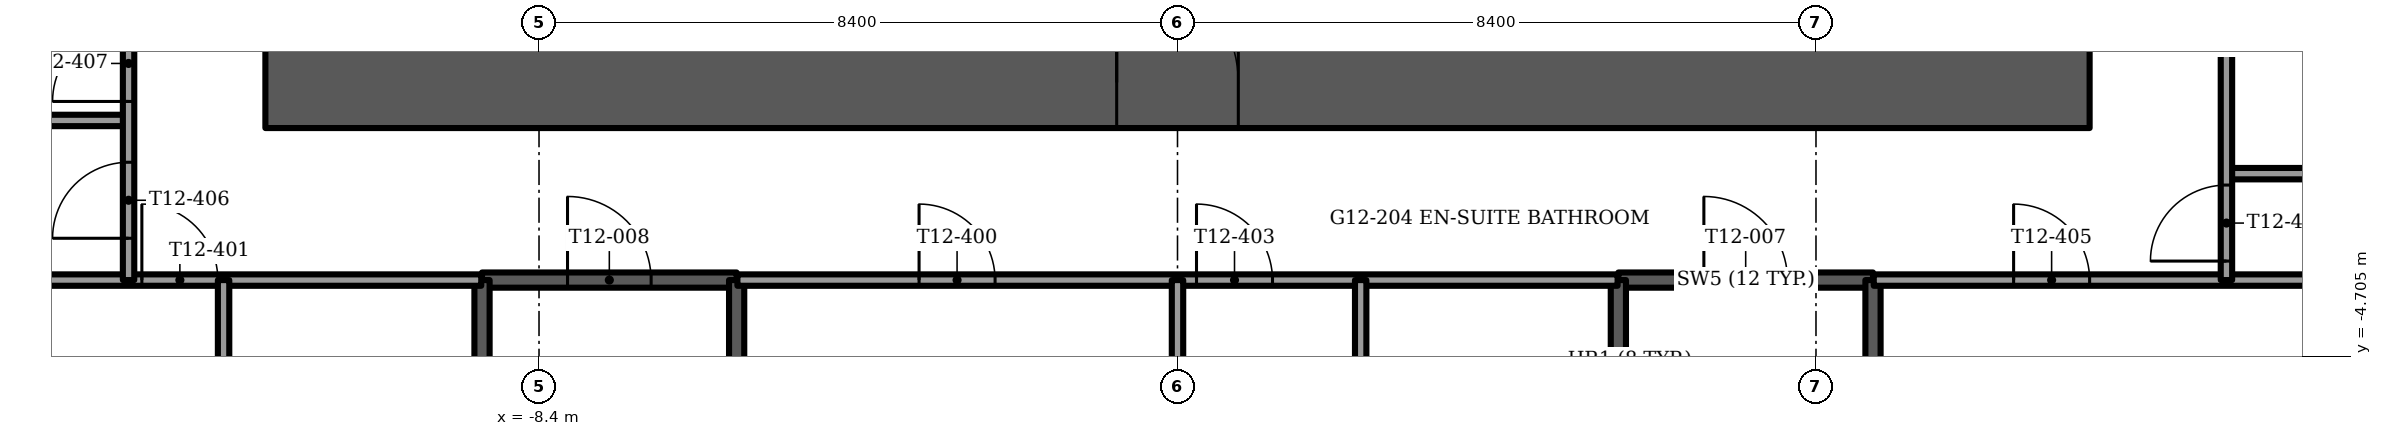
"""IFC4 building model, lengths in metres.
Left out: names, types, materials, properties, quantities, classifications, styles, units other than length and angle.
Written with IfcOpenShell. Run it as: python <this file> out.ifc"""

import sys

from ifc_helpers import new_model, si_unit, direction, frame, frame_2d, origin, place, context, subcontext, project, spatial, rectangle, extrude, element, fill, save


model = new_model("IFC4")
c1 = context("Model", 3, precision=1e-05, world=origin(), true_north=direction((0.0, 1.0)))
c2 = subcontext(c1, "Body", "Model", "MODEL_VIEW")
j1 = project(units=[si_unit("LENGTHUNIT", "METRE"), si_unit("PLANEANGLEUNIT", "RADIAN")], contexts=[c1])
p1 = place(None, origin())
s1 = spatial("IfcSite", under=j1, at=p1, CompositionType="ELEMENT")
p2 = place(p1, origin())
s2 = spatial("IfcBuilding", under=s1, at=p2, CompositionType="ELEMENT")
p3 = place(p2, frame((0.0, 0.0, 50.5)))
s3 = spatial("IfcBuildingStorey", under=s2, at=p3, CompositionType="ELEMENT", Elevation=50.5)
p4 = place(p3, frame((-12.0, -1.1, -0.3), z_axis=(0.0, 0.0, 1.0), x_axis=(1.0, 0.0, 0.0)))
e1 = element("IfcWall", 1, at=p4, inside=s3, PredefinedType="SHEAR", context=c2, shape_type="SweptSolid", body=[
    extrude(rectangle(XDim=24.0, YDim=1.2, at=frame_2d((12.0, 0.0))), origin(), (0.0, 0.0, 1.0), 3.75),
])
p5 = place(p4, frame((11.2, 0.0, 0.0)))
e2 = element("IfcOpeningElement", 2, at=p5, cuts=e1, PredefinedType="OPENING", context=c2, shape_type="SweptSolid", body=[
    extrude(rectangle(XDim=1.6, YDim=2.1, at=frame_2d((0.8, 1.05))), frame((0.0, 0.6, 0.0), z_axis=(0.0, -1.0, 0.0), x_axis=(1.0, 0.0, 0.0)), (0.0, 0.0, 1.0), 1.2),
])
p6 = place(p3, frame((-20.685, -1.023, 0.0), z_axis=(0.0, 0.0, 1.0), x_axis=(0.500004426522, -0.866022848116, 0.0)))
e3 = element("IfcWall", 3, at=p6, inside=s3, PredefinedType="SOLIDWALL", context=c2, shape_type="SweptSolid", body=[
    extrude(rectangle(XDim=18.912, YDim=0.15, at=frame_2d((9.456, 0.0))), origin(), (0.0, 0.0, 1.0), 3.45),
])
p7 = place(p6, frame((1.356, 0.0, 0.15)))
e4 = element("IfcOpeningElement", 4, at=p7, cuts=e3, PredefinedType="OPENING", context=c2, shape_type="SweptSolid", body=[
    extrude(rectangle(XDim=0.9, YDim=2.85, at=frame_2d((0.45, 1.425))), frame((0.0, 0.075, 0.0), z_axis=(0.0, -1.0, 0.0), x_axis=(1.0, 0.0, 0.0)), (0.0, 0.0, 1.0), 0.15),
])
p8 = place(p6, frame((5.556, 0.0, 0.15)))
e5 = element("IfcOpeningElement", 5, at=p8, cuts=e3, PredefinedType="OPENING", context=c2, shape_type="SweptSolid", body=[
    extrude(rectangle(XDim=1.8, YDim=2.85, at=frame_2d((0.9, 1.425))), frame((0.0, 0.075, 0.0), z_axis=(0.0, -1.0, 0.0), x_axis=(1.0, 0.0, 0.0)), (0.0, 0.0, 1.0), 0.15),
])
p9 = place(p6, frame((7.656, 0.0, 0.0)))
e6 = element("IfcOpeningElement", 6, at=p9, cuts=e3, PredefinedType="OPENING", context=c2, shape_type="SweptSolid", body=[
    extrude(rectangle(XDim=1.5, YDim=2.4, at=frame_2d((0.75, 1.2))), frame((0.0, 0.075, 0.0), z_axis=(0.0, -1.0, 0.0), x_axis=(1.0, 0.0, 0.0)), (0.0, 0.0, 1.0), 0.15),
])
p10 = place(p6, frame((9.756, 0.0, 0.15)))
e7 = element("IfcOpeningElement", 7, at=p10, cuts=e3, PredefinedType="OPENING", context=c2, shape_type="SweptSolid", body=[
    extrude(rectangle(XDim=1.8, YDim=2.85, at=frame_2d((0.9, 1.425))), frame((0.0, 0.075, 0.0), z_axis=(0.0, -1.0, 0.0), x_axis=(1.0, 0.0, 0.0)), (0.0, 0.0, 1.0), 0.15),
])
p11 = place(p6, frame((11.856, 0.0, 0.0)))
e8 = element("IfcOpeningElement", 8, at=p11, cuts=e3, PredefinedType="OPENING", context=c2, shape_type="SweptSolid", body=[
    extrude(rectangle(XDim=1.5, YDim=2.4, at=frame_2d((0.75, 1.2))), frame((0.0, 0.075, 0.0), z_axis=(0.0, -1.0, 0.0), x_axis=(1.0, 0.0, 0.0)), (0.0, 0.0, 1.0), 0.15),
])
p12 = place(p6, frame((13.956, 0.0, 0.15)))
e9 = element("IfcOpeningElement", 9, at=p12, cuts=e3, PredefinedType="OPENING", context=c2, shape_type="SweptSolid", body=[
    extrude(rectangle(XDim=1.8, YDim=2.85, at=frame_2d((0.9, 1.425))), frame((0.0, 0.075, 0.0), z_axis=(0.0, -1.0, 0.0), x_axis=(1.0, 0.0, 0.0)), (0.0, 0.0, 1.0), 0.15),
])
p13 = place(p6, frame((16.056, 0.0, 0.0)))
e10 = element("IfcOpeningElement", 10, at=p13, cuts=e3, PredefinedType="OPENING", context=c2, shape_type="SweptSolid", body=[
    extrude(rectangle(XDim=1.5, YDim=2.4, at=frame_2d((0.75, 1.2))), frame((0.0, 0.075, 0.0), z_axis=(0.0, -1.0, 0.0), x_axis=(1.0, 0.0, 0.0)), (0.0, 0.0, 1.0), 0.15),
])
p14 = place(p3, frame((11.229, -17.402, 0.0), z_axis=(0.0, 0.0, 1.0), x_axis=(0.500004426522, 0.866022848116, 0.0)))
e11 = element("IfcWall", 11, at=p14, inside=s3, PredefinedType="SOLIDWALL", context=c2, shape_type="SweptSolid", body=[
    extrude(rectangle(XDim=18.912, YDim=0.15, at=frame_2d((9.456, 0.0))), origin(), (0.0, 0.0, 1.0), 3.45),
])
p15 = place(p14, frame((1.356, 0.0, 0.15)))
e12 = element("IfcOpeningElement", 12, at=p15, cuts=e11, PredefinedType="OPENING", context=c2, shape_type="SweptSolid", body=[
    extrude(rectangle(XDim=1.8, YDim=2.85, at=frame_2d((0.9, 1.425))), frame((0.0, 0.075, 0.0), z_axis=(0.0, -1.0, 0.0), x_axis=(1.0, 0.0, 0.0)), (0.0, 0.0, 1.0), 0.15),
])
p16 = place(p14, frame((3.456, 0.0, 0.0)))
e13 = element("IfcOpeningElement", 13, at=p16, cuts=e11, PredefinedType="OPENING", context=c2, shape_type="SweptSolid", body=[
    extrude(rectangle(XDim=1.5, YDim=2.4, at=frame_2d((0.75, 1.2))), frame((0.0, 0.075, 0.0), z_axis=(0.0, -1.0, 0.0), x_axis=(1.0, 0.0, 0.0)), (0.0, 0.0, 1.0), 0.15),
])
p17 = place(p14, frame((5.556, 0.0, 0.15)))
e14 = element("IfcOpeningElement", 14, at=p17, cuts=e11, PredefinedType="OPENING", context=c2, shape_type="SweptSolid", body=[
    extrude(rectangle(XDim=1.8, YDim=2.85, at=frame_2d((0.9, 1.425))), frame((0.0, 0.075, 0.0), z_axis=(0.0, -1.0, 0.0), x_axis=(1.0, 0.0, 0.0)), (0.0, 0.0, 1.0), 0.15),
])
p18 = place(p14, frame((7.656, 0.0, 0.0)))
e15 = element("IfcOpeningElement", 15, at=p18, cuts=e11, PredefinedType="OPENING", context=c2, shape_type="SweptSolid", body=[
    extrude(rectangle(XDim=1.5, YDim=2.4, at=frame_2d((0.75, 1.2))), frame((0.0, 0.075, 0.0), z_axis=(0.0, -1.0, 0.0), x_axis=(1.0, 0.0, 0.0)), (0.0, 0.0, 1.0), 0.15),
])
p19 = place(p14, frame((9.756, 0.0, 0.15)))
e16 = element("IfcOpeningElement", 16, at=p19, cuts=e11, PredefinedType="OPENING", context=c2, shape_type="SweptSolid", body=[
    extrude(rectangle(XDim=1.8, YDim=2.85, at=frame_2d((0.9, 1.425))), frame((0.0, 0.075, 0.0), z_axis=(0.0, -1.0, 0.0), x_axis=(1.0, 0.0, 0.0)), (0.0, 0.0, 1.0), 0.15),
])
p20 = place(p14, frame((11.856, 0.0, 0.0)))
e17 = element("IfcOpeningElement", 17, at=p20, cuts=e11, PredefinedType="OPENING", context=c2, shape_type="SweptSolid", body=[
    extrude(rectangle(XDim=1.5, YDim=2.4, at=frame_2d((0.75, 1.2))), frame((0.0, 0.075, 0.0), z_axis=(0.0, -1.0, 0.0), x_axis=(1.0, 0.0, 0.0)), (0.0, 0.0, 1.0), 0.15),
])
p21 = place(p14, frame((13.956, 0.0, 0.15)))
e18 = element("IfcOpeningElement", 18, at=p21, cuts=e11, PredefinedType="OPENING", context=c2, shape_type="SweptSolid", body=[
    extrude(rectangle(XDim=0.9, YDim=2.85, at=frame_2d((0.45, 1.425))), frame((0.0, 0.075, 0.0), z_axis=(0.0, -1.0, 0.0), x_axis=(1.0, 0.0, 0.0)), (0.0, 0.0, 1.0), 0.15),
])
p22 = place(p3, frame((5.8, -3.7, -0.3), z_axis=(0.0, 0.0, 1.0), x_axis=(1.0, 0.0, 0.0)))
e19 = element("IfcWall", 19, at=p22, inside=s3, PredefinedType="SOLIDWALL", context=c2, shape_type="SweptSolid", body=[
    extrude(rectangle(XDim=3.35, YDim=0.2, at=frame_2d((1.675, 0.0))), origin(), (0.0, 0.0, 1.0), 3.75),
])
p23 = place(p22, frame((1.125, 0.0, 0.0)))
e20 = element("IfcOpeningElement", 20, at=p23, cuts=e19, PredefinedType="OPENING", context=c2, shape_type="SweptSolid", body=[
    extrude(rectangle(XDim=1.1, YDim=2.1, at=frame_2d((0.55, 1.05))), frame((0.0, 0.1, 0.0), z_axis=(0.0, -1.0, 0.0), x_axis=(1.0, 0.0, 0.0)), (0.0, 0.0, 1.0), 0.2),
])
for number, where, z_axis, x_axis in (
    (21, (5.8, -3.7, -0.3), (0.0, 0.0, 1.0), (0.0, -1.0, 0.0)),
    (22, (9.15, -3.7, -0.3), (0.0, 0.0, 1.0), (0.0, -1.0, 0.0)),
):
    element("IfcWall", number, at=place(p3, frame(where, z_axis=z_axis, x_axis=x_axis)), inside=s3, PredefinedType="SOLIDWALL", context=c2, shape_type="SweptSolid", body=[
        extrude(rectangle(XDim=7.7, YDim=0.2, at=frame_2d((3.85, 0.0))), origin(), (0.0, 0.0, 1.0), 3.75),
    ])
p24 = place(p3, frame((-9.15, -3.7, -0.3), z_axis=(0.0, 0.0, 1.0), x_axis=(1.0, 0.0, 0.0)))
e23 = element("IfcWall", 23, at=p24, inside=s3, PredefinedType="SOLIDWALL", context=c2, shape_type="SweptSolid", body=[
    extrude(rectangle(XDim=3.35, YDim=0.2, at=frame_2d((1.675, 0.0))), origin(), (0.0, 0.0, 1.0), 3.75),
])
p25 = place(p24, frame((1.125, 0.0, 0.0)))
e24 = element("IfcOpeningElement", 24, at=p25, cuts=e23, PredefinedType="OPENING", context=c2, shape_type="SweptSolid", body=[
    extrude(rectangle(XDim=1.1, YDim=2.1, at=frame_2d((0.55, 1.05))), frame((0.0, 0.1, 0.0), z_axis=(0.0, -1.0, 0.0), x_axis=(1.0, 0.0, 0.0)), (0.0, 0.0, 1.0), 0.2),
])
for number, where, z_axis, x_axis in (
    (25, (-9.15, -3.7, -0.3), (0.0, 0.0, 1.0), (0.0, -1.0, 0.0)),
    (26, (-5.8, -3.7, -0.3), (0.0, 0.0, 1.0), (0.0, -1.0, 0.0)),
):
    element("IfcWall", number, at=place(p3, frame(where, z_axis=z_axis, x_axis=x_axis)), inside=s3, PredefinedType="SOLIDWALL", context=c2, shape_type="SweptSolid", body=[
        extrude(rectangle(XDim=7.7, YDim=0.2, at=frame_2d((3.85, 0.0))), origin(), (0.0, 0.0, 1.0), 3.75),
    ])
p26 = place(p3, frame((-19.191, -3.7, 0.0), z_axis=(0.0, 0.0, 1.0), x_axis=(1.0, 0.0, 0.0)))
e27 = element("IfcWall", 27, at=p26, inside=s3, PredefinedType="PARTITIONING", context=c2, shape_type="SweptSolid", body=[
    extrude(rectangle(XDim=10.031, YDim=0.15, at=frame_2d((5.016, 0.0))), origin(), (0.0, 0.0, 1.0), 3.45),
])
p27 = place(p26, frame((5.566, 0.0, 0.0)))
e28 = element("IfcOpeningElement", 28, at=p27, cuts=e27, PredefinedType="OPENING", context=c2, shape_type="SweptSolid", body=[
    extrude(rectangle(XDim=1.0, YDim=2.1, at=frame_2d((0.5, 1.05))), frame((0.0, 0.075, 0.0), z_axis=(0.0, -1.0, 0.0), x_axis=(1.0, 0.0, 0.0)), (0.0, 0.0, 1.0), 0.15),
])
p28 = place(p3, frame((-5.79, -3.7, 0.0), z_axis=(0.0, 0.0, 1.0), x_axis=(1.0, 0.0, 0.0)))
e29 = element("IfcWall", 29, at=p28, inside=s3, PredefinedType="PARTITIONING", context=c2, shape_type="SweptSolid", body=[
    extrude(rectangle(XDim=11.58, YDim=0.15, at=frame_2d((5.79, 0.0))), origin(), (0.0, 0.0, 1.0), 3.45),
])
p29 = place(p28, frame((2.39, 0.0, 0.0)))
e30 = element("IfcOpeningElement", 30, at=p29, cuts=e29, PredefinedType="OPENING", context=c2, shape_type="SweptSolid", body=[
    extrude(rectangle(XDim=1.0, YDim=2.1, at=frame_2d((0.5, 1.05))), frame((0.0, 0.075, 0.0), z_axis=(0.0, -1.0, 0.0), x_axis=(1.0, 0.0, 0.0)), (0.0, 0.0, 1.0), 0.15),
])
p30 = place(p28, frame((6.04, 0.0, 0.0)))
e31 = element("IfcOpeningElement", 31, at=p30, cuts=e29, PredefinedType="OPENING", context=c2, shape_type="SweptSolid", body=[
    extrude(rectangle(XDim=1.0, YDim=2.1, at=frame_2d((0.5, 1.05))), frame((0.0, 0.075, 0.0), z_axis=(0.0, -1.0, 0.0), x_axis=(1.0, 0.0, 0.0)), (0.0, 0.0, 1.0), 0.15),
])
p31 = place(p3, frame((9.16, -3.7, 0.0), z_axis=(0.0, 0.0, 1.0), x_axis=(1.0, 0.0, 0.0)))
e32 = element("IfcWall", 32, at=p31, inside=s3, PredefinedType="PARTITIONING", context=c2, shape_type="SweptSolid", body=[
    extrude(rectangle(XDim=10.031, YDim=0.15, at=frame_2d((5.016, 0.0))), origin(), (0.0, 0.0, 1.0), 3.45),
])
p32 = place(p31, frame((1.84, 0.0, 0.0)))
e33 = element("IfcOpeningElement", 33, at=p32, cuts=e32, PredefinedType="OPENING", context=c2, shape_type="SweptSolid", body=[
    extrude(rectangle(XDim=1.0, YDim=2.1, at=frame_2d((0.5, 1.05))), frame((0.0, 0.075, 0.0), z_axis=(0.0, -1.0, 0.0), x_axis=(1.0, 0.0, 0.0)), (0.0, 0.0, 1.0), 0.15),
])
p33 = place(p3, frame((13.8, -2.3, 0.0), z_axis=(0.0, 0.0, 1.0), x_axis=(1.0, 0.0, 0.0)))
e34 = element("IfcWall", 34, at=p33, inside=s3, PredefinedType="PARTITIONING", context=c2, shape_type="SweptSolid", body=[
    extrude(rectangle(XDim=3.05, YDim=0.15, at=frame_2d((1.525, 0.0))), origin(), (0.0, 0.0, 1.0), 3.45),
])
p34 = place(p33, frame((1.075, 0.0, 0.0)))
e35 = element("IfcOpeningElement", 35, at=p34, cuts=e34, PredefinedType="OPENING", context=c2, shape_type="SweptSolid", body=[
    extrude(rectangle(XDim=0.9, YDim=2.1, at=frame_2d((0.45, 1.05))), frame((0.0, 0.075, 0.0), z_axis=(0.0, -1.0, 0.0), x_axis=(1.0, 0.0, 0.0)), (0.0, 0.0, 1.0), 0.15),
])
p35 = place(p3, frame((-20.404, -1.6, 0.0), z_axis=(0.0, 0.0, 1.0), x_axis=(1.0, 0.0, 0.0)))
e36 = element("IfcWall", 36, at=p35, inside=s3, PredefinedType="PARTITIONING", context=c2, shape_type="SweptSolid", body=[
    extrude(rectangle(XDim=6.604, YDim=0.15, at=frame_2d((3.302, 0.0))), origin(), (0.0, 0.0, 1.0), 3.45),
])
p36 = place(p3, frame((13.8, -3.7, 0.0), z_axis=(0.0, 0.0, 1.0), x_axis=(0.0, 1.0, 0.0)))
e37 = element("IfcWall", 37, at=p36, inside=s3, PredefinedType="PARTITIONING", context=c2, shape_type="SweptSolid", body=[
    extrude(rectangle(XDim=15.756, YDim=0.15, at=frame_2d((7.878, 0.0))), origin(), (0.0, 0.0, 1.0), 3.45),
])
p37 = place(p36, frame((0.25, 0.0, 0.0)))
e38 = element("IfcOpeningElement", 38, at=p37, cuts=e37, PredefinedType="OPENING", context=c2, shape_type="SweptSolid", body=[
    extrude(rectangle(XDim=1.0, YDim=2.1, at=frame_2d((0.5, 1.05))), frame((0.0, 0.075, 0.0), z_axis=(0.0, -1.0, 0.0), x_axis=(1.0, 0.0, 0.0)), (0.0, 0.0, 1.0), 0.15),
])
p38 = place(p36, frame((5.275, 0.0, 0.0)))
e39 = element("IfcOpeningElement", 39, at=p38, cuts=e37, PredefinedType="OPENING", context=c2, shape_type="SweptSolid", body=[
    extrude(rectangle(XDim=1.0, YDim=2.1, at=frame_2d((0.5, 1.05))), frame((0.0, 0.075, 0.0), z_axis=(0.0, -1.0, 0.0), x_axis=(1.0, 0.0, 0.0)), (0.0, 0.0, 1.0), 0.15),
])
p39 = place(p36, frame((10.933, 0.0, 0.0)))
e40 = element("IfcOpeningElement", 40, at=p39, cuts=e37, PredefinedType="OPENING", context=c2, shape_type="SweptSolid", body=[
    extrude(rectangle(XDim=1.0, YDim=2.1, at=frame_2d((0.5, 1.05))), frame((0.0, 0.075, 0.0), z_axis=(0.0, -1.0, 0.0), x_axis=(1.0, 0.0, 0.0)), (0.0, 0.0, 1.0), 0.15),
])
p40 = place(p3, frame((2.41, -7.3, 0.0), z_axis=(0.0, 0.0, 1.0), x_axis=(0.0, 1.0, 0.0)))
e41 = element("IfcWall", 41, at=p40, inside=s3, PredefinedType="PARTITIONING", context=c2, shape_type="SweptSolid", body=[
    extrude(rectangle(XDim=3.6, YDim=0.15, at=frame_2d((1.8, 0.0))), origin(), (0.0, 0.0, 1.0), 3.45),
])
p41 = place(p40, frame((1.4, 0.0, 0.0)))
e42 = element("IfcOpeningElement", 42, at=p41, cuts=e41, PredefinedType="OPENING", context=c2, shape_type="SweptSolid", body=[
    extrude(rectangle(XDim=0.8, YDim=2.1, at=frame_2d((0.4, 1.05))), frame((0.0, 0.075, 0.0), z_axis=(0.0, -1.0, 0.0), x_axis=(1.0, 0.0, 0.0)), (0.0, 0.0, 1.0), 0.15),
])
p42 = place(p3, frame((0.0, -17.979, 0.0), z_axis=(0.0, 0.0, 1.0), x_axis=(0.0, 1.0, 0.0)))
e43 = element("IfcWall", 43, at=p42, inside=s3, PredefinedType="PARTITIONING", context=c2, shape_type="SweptSolid", body=[
    extrude(rectangle(XDim=14.279, YDim=0.15, at=frame_2d((7.14, 0.0))), origin(), (0.0, 0.0, 1.0), 3.45),
])
p43 = place(p3, frame((-12.55, -7.3, 0.0), z_axis=(0.0, 0.0, 1.0), x_axis=(0.0, 1.0, 0.0)))
e44 = element("IfcWall", 44, at=p43, inside=s3, PredefinedType="PARTITIONING", context=c2, shape_type="SweptSolid", body=[
    extrude(rectangle(XDim=3.6, YDim=0.15, at=frame_2d((1.8, 0.0))), origin(), (0.0, 0.0, 1.0), 3.45),
])
p44 = place(p43, frame((1.4, 0.0, 0.0)))
e45 = element("IfcOpeningElement", 45, at=p44, cuts=e44, PredefinedType="OPENING", context=c2, shape_type="SweptSolid", body=[
    extrude(rectangle(XDim=0.8, YDim=2.1, at=frame_2d((0.4, 1.05))), frame((0.0, 0.075, 0.0), z_axis=(0.0, -1.0, 0.0), x_axis=(1.0, 0.0, 0.0)), (0.0, 0.0, 1.0), 0.15),
])
p45 = place(p3, frame((-13.8, -3.7, 0.0), z_axis=(0.0, 0.0, 1.0), x_axis=(0.0, 1.0, 0.0)))
e46 = element("IfcWall", 46, at=p45, inside=s3, PredefinedType="PARTITIONING", context=c2, shape_type="SweptSolid", body=[
    extrude(rectangle(XDim=15.756, YDim=0.15, at=frame_2d((7.878, 0.0))), origin(), (0.0, 0.0, 1.0), 3.45),
])
p46 = place(p45, frame((0.55, 0.0, 0.0)))
e47 = element("IfcOpeningElement", 47, at=p46, cuts=e46, PredefinedType="OPENING", context=c2, shape_type="SweptSolid", body=[
    extrude(rectangle(XDim=1.0, YDim=2.1, at=frame_2d((0.5, 1.05))), frame((0.0, 0.075, 0.0), z_axis=(0.0, -1.0, 0.0), x_axis=(1.0, 0.0, 0.0)), (0.0, 0.0, 1.0), 0.15),
])
p47 = place(p45, frame((2.35, 0.0, 0.0)))
e48 = element("IfcOpeningElement", 48, at=p47, cuts=e46, PredefinedType="OPENING", context=c2, shape_type="SweptSolid", body=[
    extrude(rectangle(XDim=1.0, YDim=2.1, at=frame_2d((0.5, 1.05))), frame((0.0, 0.075, 0.0), z_axis=(0.0, -1.0, 0.0), x_axis=(1.0, 0.0, 0.0)), (0.0, 0.0, 1.0), 0.15),
])
p48 = place(p45, frame((10.407, 0.0, 0.0)))
e49 = element("IfcOpeningElement", 49, at=p48, cuts=e46, PredefinedType="OPENING", context=c2, shape_type="SweptSolid", body=[
    extrude(rectangle(XDim=1.0, YDim=2.1, at=frame_2d((0.5, 1.05))), frame((0.0, 0.075, 0.0), z_axis=(0.0, -1.0, 0.0), x_axis=(1.0, 0.0, 0.0)), (0.0, 0.0, 1.0), 0.15),
])
p49 = place(p5, origin())
e50 = element("IfcDoor", 50, at=p49, inside=s3, OperationType="DOUBLE_DOOR_SINGLE_SWING", PredefinedType="DOOR", context=c2, shape_type="SweptSolid", body=[
    extrude(rectangle(XDim=1.6, YDim=2.1, at=frame_2d((0.8, 1.05))), frame((0.0, 0.025, 0.0), z_axis=(0.0, -1.0, 0.0), x_axis=(1.0, 0.0, 0.0)), (0.0, 0.0, 1.0), 0.05),
])
fill(e2, e50)
p50 = place(p23, origin())
e51 = element("IfcDoor", 51, at=p50, inside=s3, OperationType="SINGLE_SWING_LEFT", PredefinedType="DOOR", context=c2, shape_type="SweptSolid", body=[
    extrude(rectangle(XDim=1.1, YDim=2.1, at=frame_2d((0.55, 1.05))), frame((0.0, 0.025, 0.0), z_axis=(0.0, -1.0, 0.0), x_axis=(1.0, 0.0, 0.0)), (0.0, 0.0, 1.0), 0.05),
])
fill(e20, e51)
p51 = place(p25, origin())
e52 = element("IfcDoor", 52, at=p51, inside=s3, OperationType="SINGLE_SWING_LEFT", PredefinedType="DOOR", context=c2, shape_type="SweptSolid", body=[
    extrude(rectangle(XDim=1.1, YDim=2.1, at=frame_2d((0.55, 1.05))), frame((0.0, 0.025, 0.0), z_axis=(0.0, -1.0, 0.0), x_axis=(1.0, 0.0, 0.0)), (0.0, 0.0, 1.0), 0.05),
])
fill(e24, e52)
p52 = place(p29, origin())
e53 = element("IfcDoor", 53, at=p52, inside=s3, OperationType="SINGLE_SWING_RIGHT", PredefinedType="DOOR", context=c2, shape_type="SweptSolid", body=[
    extrude(rectangle(XDim=1.0, YDim=2.1, at=frame_2d((0.5, 1.05))), frame((0.0, 0.025, 0.0), z_axis=(0.0, -1.0, 0.0), x_axis=(1.0, 0.0, 0.0)), (0.0, 0.0, 1.0), 0.05),
])
fill(e30, e53)
p53 = place(p27, origin())
e54 = element("IfcDoor", 54, at=p53, inside=s3, OperationType="SINGLE_SWING_LEFT", PredefinedType="DOOR", context=c2, shape_type="SweptSolid", body=[
    extrude(rectangle(XDim=1.0, YDim=2.1, at=frame_2d((0.5, 1.05))), frame((0.0, 0.025, 0.0), z_axis=(0.0, -1.0, 0.0), x_axis=(1.0, 0.0, 0.0)), (0.0, 0.0, 1.0), 0.05),
])
fill(e28, e54)
p54 = place(p30, origin())
e55 = element("IfcDoor", 55, at=p54, inside=s3, OperationType="SINGLE_SWING_LEFT", PredefinedType="DOOR", context=c2, shape_type="SweptSolid", body=[
    extrude(rectangle(XDim=1.0, YDim=2.1, at=frame_2d((0.5, 1.05))), frame((0.0, 0.025, 0.0), z_axis=(0.0, -1.0, 0.0), x_axis=(1.0, 0.0, 0.0)), (0.0, 0.0, 1.0), 0.05),
])
fill(e31, e55)
p55 = place(p32, origin())
e56 = element("IfcDoor", 56, at=p55, inside=s3, OperationType="SINGLE_SWING_LEFT", PredefinedType="DOOR", context=c2, shape_type="SweptSolid", body=[
    extrude(rectangle(XDim=1.0, YDim=2.1, at=frame_2d((0.5, 1.05))), frame((0.0, 0.025, 0.0), z_axis=(0.0, -1.0, 0.0), x_axis=(1.0, 0.0, 0.0)), (0.0, 0.0, 1.0), 0.05),
])
fill(e33, e56)
p56 = place(p46, origin())
e57 = element("IfcDoor", 57, at=p56, inside=s3, OperationType="SINGLE_SWING_LEFT", PredefinedType="DOOR", context=c2, shape_type="SweptSolid", body=[
    extrude(rectangle(XDim=1.0, YDim=2.1, at=frame_2d((0.5, 1.05))), frame((0.0, 0.025, 0.0), z_axis=(0.0, -1.0, 0.0), x_axis=(1.0, 0.0, 0.0)), (0.0, 0.0, 1.0), 0.05),
])
fill(e47, e57)
p57 = place(p47, origin())
e58 = element("IfcDoor", 58, at=p57, inside=s3, OperationType="SINGLE_SWING_LEFT", PredefinedType="DOOR", context=c2, shape_type="SweptSolid", body=[
    extrude(rectangle(XDim=1.0, YDim=2.1, at=frame_2d((0.5, 1.05))), frame((0.0, 0.025, 0.0), z_axis=(0.0, -1.0, 0.0), x_axis=(1.0, 0.0, 0.0)), (0.0, 0.0, 1.0), 0.05),
])
fill(e48, e58)
p58 = place(p37, origin())
e59 = element("IfcDoor", 59, at=p58, inside=s3, OperationType="SINGLE_SWING_LEFT", PredefinedType="DOOR", context=c2, shape_type="SweptSolid", body=[
    extrude(rectangle(XDim=1.0, YDim=2.1, at=frame_2d((0.5, 1.05))), frame((0.0, 0.025, 0.0), z_axis=(0.0, -1.0, 0.0), x_axis=(1.0, 0.0, 0.0)), (0.0, 0.0, 1.0), 0.05),
])
fill(e38, e59)
save(model, sys.argv[1])
